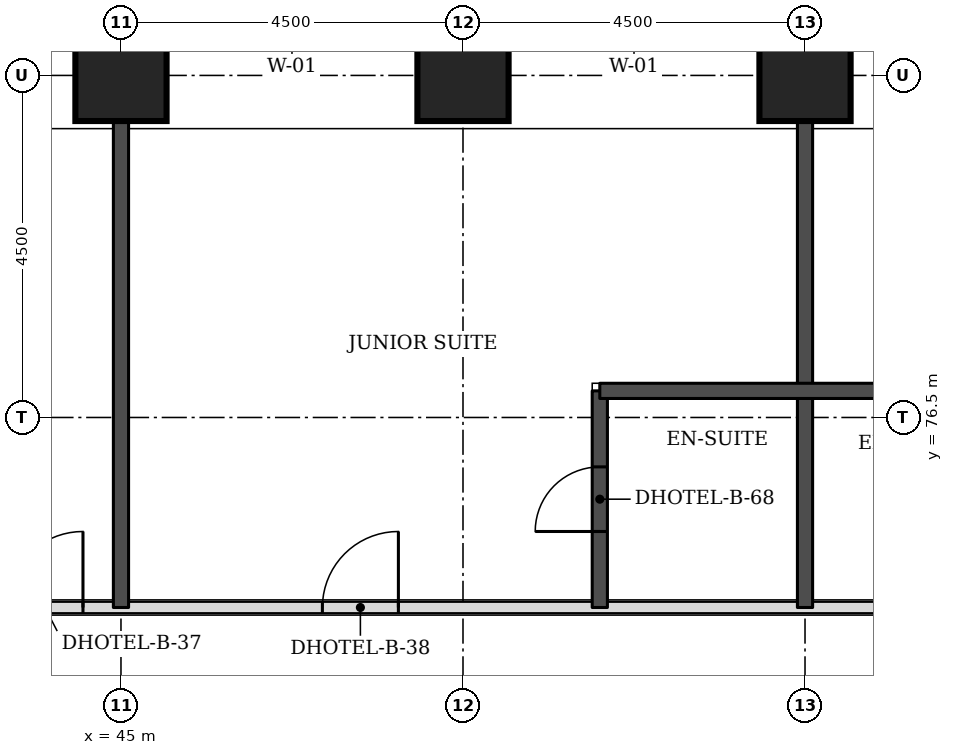
"""IFC4 building model, lengths in metres.
Left out: names, types, materials, properties, quantities, classifications, styles, units other than length and angle.
Written with IfcOpenShell. Run it as: python <this file> out.ifc"""

import sys

from ifc_helpers import new_model, si_unit, direction, frame, frame_2d, origin, origin_2d, place, context, subcontext, project, spatial, rectangle, extrude, element, fill, save


model = new_model("IFC4")
c1 = context("Model", 3, precision=1e-05, world=origin(), true_north=direction((0.0, 1.0)))
c2 = subcontext(c1, "Body", "Model", "MODEL_VIEW")
j1 = project(units=[si_unit("LENGTHUNIT", "METRE"), si_unit("PLANEANGLEUNIT", "RADIAN")], contexts=[c1])
p1 = place(None, origin())
s1 = spatial("IfcSite", under=j1, at=p1, CompositionType="ELEMENT")
p2 = place(p1, origin())
s2 = spatial("IfcBuilding", under=s1, at=p2, CompositionType="ELEMENT")
p3 = place(p2, frame((0.0, 0.0, 29.7)))
s3 = spatial("IfcBuildingStorey", under=s2, at=p3, CompositionType="ELEMENT", Elevation=29.7)
for number, where, z_axis, x_axis in (
    (1, (45.0, 81.0, 0.0), (0.0, 0.0, 1.0), (1.0, 0.0, 0.0)),
    (2, (49.5, 81.0, 0.0), (0.0, 0.0, 1.0), (1.0, 0.0, 0.0)),
    (3, (54.0, 81.0, 0.0), (0.0, 0.0, 1.0), (1.0, 0.0, 0.0)),
):
    element("IfcColumn", number, at=place(p3, frame(where, z_axis=z_axis, x_axis=x_axis)), inside=s3, PredefinedType="COLUMN", context=c2, shape_type="SweptSolid", body=[
        extrude(rectangle(XDim=1.2, YDim=1.2, at=origin_2d()), origin(), (0.0, 0.0, 1.0), 3.3),
    ])
p4 = place(p3, frame((43.0, 74.0, 0.0), z_axis=(0.0, 0.0, 1.0), x_axis=(1.0, 0.0, 0.0)))
e4 = element("IfcWall", 4, at=p4, inside=s3, PredefinedType="PARTITIONING", context=c2, shape_type="SweptSolid", body=[
    extrude(rectangle(XDim=26.5, YDim=0.15, at=frame_2d((13.25, 0.0))), origin(), (0.0, 0.0, 1.0), 3.08),
])
p5 = place(p4, frame((4.65, 0.0, 0.0)))
e5 = element("IfcOpeningElement", 5, at=p5, cuts=e4, PredefinedType="OPENING", context=c2, shape_type="SweptSolid", body=[
    extrude(rectangle(XDim=1.0, YDim=2.1, at=frame_2d((0.5, 1.05))), frame((0.0, 0.085, 0.0), z_axis=(0.0, -1.0, 0.0), x_axis=(1.0, 0.0, 0.0)), (0.0, 0.0, 1.0), 0.17),
])
p6 = place(p4, frame((16.6, 0.0, 0.0)))
e6 = element("IfcOpeningElement", 6, at=p6, cuts=e4, PredefinedType="OPENING", context=c2, shape_type="SweptSolid", body=[
    extrude(rectangle(XDim=1.0, YDim=2.1, at=frame_2d((0.5, 1.05))), frame((0.0, 0.085, 0.0), z_axis=(0.0, -1.0, 0.0), x_axis=(1.0, 0.0, 0.0)), (0.0, 0.0, 1.0), 0.17),
])
p7 = place(p4, frame((20.7, 0.0, 0.0)))
e7 = element("IfcOpeningElement", 7, at=p7, cuts=e4, PredefinedType="OPENING", context=c2, shape_type="SweptSolid", body=[
    extrude(rectangle(XDim=1.0, YDim=2.1, at=frame_2d((0.5, 1.05))), frame((0.0, 0.085, 0.0), z_axis=(0.0, -1.0, 0.0), x_axis=(1.0, 0.0, 0.0)), (0.0, 0.0, 1.0), 0.17),
])
p8 = place(p4, frame((0.5, 0.0, 0.0)))
e8 = element("IfcOpeningElement", 8, at=p8, cuts=e4, PredefinedType="OPENING", context=c2, shape_type="SweptSolid", body=[
    extrude(rectangle(XDim=1.0, YDim=2.1, at=frame_2d((0.5, 1.05))), frame((0.0, 0.085, 0.0), z_axis=(0.0, -1.0, 0.0), x_axis=(1.0, 0.0, 0.0)), (0.0, 0.0, 1.0), 0.17),
])
p9 = place(p4, frame((25.0, 0.0, 0.0)))
e9 = element("IfcOpeningElement", 9, at=p9, cuts=e4, PredefinedType="OPENING", context=c2, shape_type="SweptSolid", body=[
    extrude(rectangle(XDim=1.0, YDim=2.1, at=frame_2d((0.5, 1.05))), frame((0.0, 0.085, 0.0), z_axis=(0.0, -1.0, 0.0), x_axis=(1.0, 0.0, 0.0)), (0.0, 0.0, 1.0), 0.17),
])
p10 = place(p3, frame((45.0, 74.0, 0.0), z_axis=(0.0, 0.0, 1.0), x_axis=(0.0, 1.0, 0.0)))
e10 = element("IfcWall", 10, at=p10, inside=s3, PredefinedType="SOLIDWALL", context=c2, shape_type="SweptSolid", body=[
    extrude(rectangle(XDim=6.4, YDim=0.2, at=frame_2d((3.2, 0.0))), origin(), (0.0, 0.0, 1.0), 3.08),
])
p11 = place(p3, frame((51.3, 74.0, 0.0), z_axis=(0.0, 0.0, 1.0), x_axis=(0.0, 1.0, 0.0)))
e11 = element("IfcWall", 11, at=p11, inside=s3, PredefinedType="SOLIDWALL", context=c2, shape_type="SweptSolid", body=[
    extrude(rectangle(XDim=2.85, YDim=0.2, at=frame_2d((1.425, 0.0))), origin(), (0.0, 0.0, 1.0), 3.08),
])
p12 = place(p11, frame((1.0, 0.0, 0.0)))
e12 = element("IfcOpeningElement", 12, at=p12, cuts=e11, PredefinedType="OPENING", context=c2, shape_type="SweptSolid", body=[
    extrude(rectangle(XDim=0.85, YDim=2.1, at=frame_2d((0.425, 1.05))), frame((0.0, 0.11, 0.0), z_axis=(0.0, -1.0, 0.0), x_axis=(1.0, 0.0, 0.0)), (0.0, 0.0, 1.0), 0.22),
])
p13 = place(p3, frame((54.0, 74.0, 0.0), z_axis=(0.0, 0.0, 1.0), x_axis=(0.0, 1.0, 0.0)))
e13 = element("IfcWall", 13, at=p13, inside=s3, PredefinedType="SOLIDWALL", context=c2, shape_type="SweptSolid", body=[
    extrude(rectangle(XDim=6.4, YDim=0.2, at=frame_2d((3.2, 0.0))), origin(), (0.0, 0.0, 1.0), 3.08),
])
p14 = place(p3, frame((51.3, 76.85, 0.0), z_axis=(0.0, 0.0, 1.0), x_axis=(1.0, 0.0, 0.0)))
e14 = element("IfcWall", 14, at=p14, inside=s3, PredefinedType="SOLIDWALL", context=c2, shape_type="SweptSolid", body=[
    extrude(rectangle(XDim=5.9, YDim=0.2, at=frame_2d((2.95, 0.0))), origin(), (0.0, 0.0, 1.0), 3.08),
])
p15 = place(p5, origin())
e15 = element("IfcDoor", 15, at=p15, inside=s3, OperationType="SINGLE_SWING_RIGHT", PredefinedType="DOOR", context=c2, shape_type="SweptSolid", body=[
    extrude(rectangle(XDim=1.0, YDim=2.1, at=frame_2d((0.5, 1.05))), frame((0.0, 0.025, 0.0), z_axis=(0.0, -1.0, 0.0), x_axis=(1.0, 0.0, 0.0)), (0.0, 0.0, 1.0), 0.05),
])
fill(e5, e15)
p16 = place(p12, origin())
e16 = element("IfcDoor", 16, at=p16, inside=s3, OperationType="SINGLE_SWING_LEFT", PredefinedType="DOOR", context=c2, shape_type="SweptSolid", body=[
    extrude(rectangle(XDim=0.85, YDim=2.1, at=frame_2d((0.425, 1.05))), frame((0.0, 0.025, 0.0), z_axis=(0.0, -1.0, 0.0), x_axis=(1.0, 0.0, 0.0)), (0.0, 0.0, 1.0), 0.05),
])
fill(e12, e16)
p17 = place(p8, origin())
e17 = element("IfcDoor", 17, at=p17, inside=s3, OperationType="SINGLE_SWING_RIGHT", PredefinedType="DOOR", context=c2, shape_type="SweptSolid", body=[
    extrude(rectangle(XDim=1.0, YDim=2.1, at=frame_2d((0.5, 1.05))), frame((0.0, 0.025, 0.0), z_axis=(0.0, -1.0, 0.0), x_axis=(1.0, 0.0, 0.0)), (0.0, 0.0, 1.0), 0.05),
])
fill(e8, e17)
save(model, sys.argv[1])
